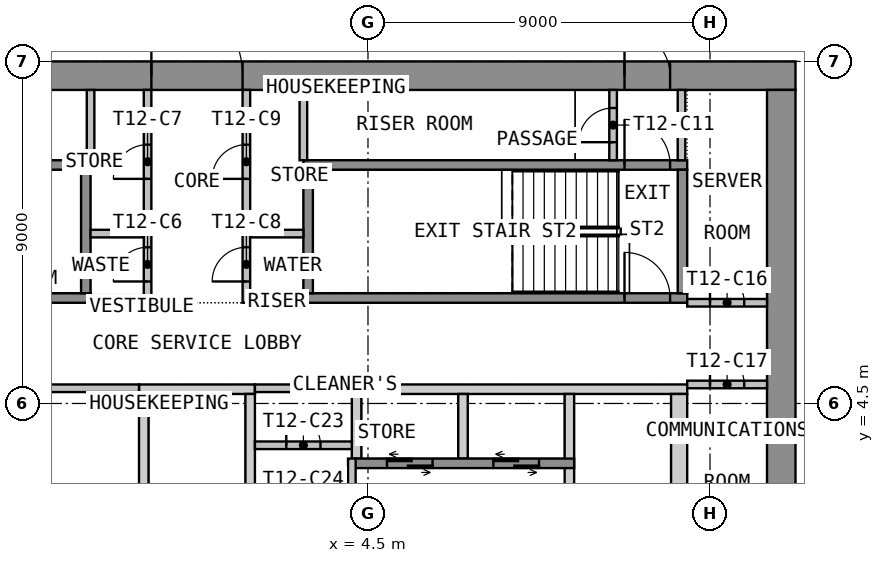
"""IFC4 building model, lengths in metres.
Left out: names, types, materials, properties, quantities, classifications, styles, units other than length and angle.
Written with IfcOpenShell. Run it as: python <this file> out.ifc"""

import sys

from ifc_helpers import new_model, si_unit, direction, frame, frame_2d, origin, place, context, subcontext, project, spatial, polyline, rectangle, outline, extrude, element, fill, save


model = new_model("IFC4")
c1 = context("Model", 3, precision=1e-05, world=origin(), true_north=direction((0.0, 1.0)))
c2 = subcontext(c1, "Body", "Model", "MODEL_VIEW")
j1 = project(units=[si_unit("LENGTHUNIT", "METRE"), si_unit("PLANEANGLEUNIT", "RADIAN")], contexts=[c1])
p1 = place(None, origin())
s1 = spatial("IfcSite", under=j1, at=p1, CompositionType="ELEMENT")
p2 = place(p1, origin())
s2 = spatial("IfcBuilding", under=s1, at=p2, CompositionType="ELEMENT")
p3 = place(p2, frame((0.0, 0.0, 167.7)))
s3 = spatial("IfcBuildingStorey", under=s2, at=p3, CompositionType="ELEMENT", Elevation=167.7)
p4 = place(p3, frame((-15.75, 13.125, 0.0), z_axis=(0.0, 0.0, 1.0), x_axis=(1.0, 0.0, 0.0)))
e1 = element("IfcWall", 1, at=p4, inside=s3, PredefinedType="SHEAR", context=c2, shape_type="SweptSolid", body=[
    extrude(rectangle(XDim=31.5, YDim=0.75, at=frame_2d((15.75, 0.0))), origin(), (0.0, 0.0, 1.0), 3.575),
])
p5 = place(p4, frame((14.55, 0.0, 0.0)))
e2 = element("IfcOpeningElement", 2, at=p5, cuts=e1, PredefinedType="OPENING", context=c2, shape_type="SweptSolid", body=[
    extrude(rectangle(XDim=2.4, YDim=2.1, at=frame_2d((1.2, 1.05))), frame((0.0, 0.385, 0.0), z_axis=(0.0, -1.0, 0.0), x_axis=(1.0, 0.0, 0.0)), (0.0, 0.0, 1.0), 0.77),
])
p6 = place(p4, frame((3.3, 0.0, 0.0)))
e3 = element("IfcOpeningElement", 3, at=p6, cuts=e1, PredefinedType="OPENING", context=c2, shape_type="SweptSolid", body=[
    extrude(rectangle(XDim=1.2, YDim=2.1, at=frame_2d((0.6, 1.05))), frame((0.0, 0.385, 0.0), z_axis=(0.0, -1.0, 0.0), x_axis=(1.0, 0.0, 0.0)), (0.0, 0.0, 1.0), 0.77),
])
p7 = place(p4, frame((27.0, 0.0, 0.0)))
e4 = element("IfcOpeningElement", 4, at=p7, cuts=e1, PredefinedType="OPENING", context=c2, shape_type="SweptSolid", body=[
    extrude(rectangle(XDim=1.2, YDim=2.1, at=frame_2d((0.6, 1.05))), frame((0.0, 0.385, 0.0), z_axis=(0.0, -1.0, 0.0), x_axis=(1.0, 0.0, 0.0)), (0.0, 0.0, 1.0), 0.77),
])
p8 = place(p3, frame((15.375, -12.75, 0.0), z_axis=(0.0, 0.0, 1.0), x_axis=(0.0, 1.0, 0.0)))
e5 = element("IfcWall", 5, at=p8, inside=s3, PredefinedType="SHEAR", context=c2, shape_type="SweptSolid", body=[
    extrude(rectangle(XDim=25.5, YDim=0.75, at=frame_2d((12.75, 0.0))), origin(), (0.0, 0.0, 1.0), 3.575),
])
p9 = place(p8, frame((11.55, 0.0, 0.0)))
e6 = element("IfcOpeningElement", 6, at=p9, cuts=e5, PredefinedType="OPENING", context=c2, shape_type="SweptSolid", body=[
    extrude(rectangle(XDim=2.4, YDim=2.1, at=frame_2d((1.2, 1.05))), frame((0.0, 0.385, 0.0), z_axis=(0.0, -1.0, 0.0), x_axis=(1.0, 0.0, 0.0)), (0.0, 0.0, 1.0), 0.77),
])
p10 = place(p3, origin())
e7 = element("IfcWall", 7, at=p10, inside=s3, PredefinedType="SHEAR", context=c2, shape_type="SweptSolid", body=[
    extrude(outline(polyline([(-1.525, 4.75), (1.525, 4.75), (1.525, 5.0), (-1.525, 5.0), (-1.525, 4.75)])), origin(), (0.0, 0.0, 1.0), 3.575),
])
p11 = place(p3, origin())
e8 = element("IfcWall", 8, at=p11, inside=s3, PredefinedType="SHEAR", context=c2, shape_type="SweptSolid", body=[
    extrude(outline(polyline([(4.075, 4.75), (12.9, 4.75), (12.9, 5.0), (4.075, 5.0), (4.075, 4.75)])), origin(), (0.0, 0.0, 1.0), 3.575),
])
p12 = place(p3, origin())
e9 = element("IfcWall", 9, at=p12, inside=s3, PredefinedType="SHEAR", context=c2, shape_type="SweptSolid", body=[
    extrude(outline(polyline([(-1.525, 2.05), (-1.275, 2.05), (-1.275, 4.75), (-1.525, 4.75), (-1.525, 2.05)])), origin(), (0.0, 0.0, 1.0), 3.575),
])
p13 = place(p3, origin())
e10 = element("IfcWall", 10, at=p13, inside=s3, PredefinedType="SHEAR", context=c2, shape_type="SweptSolid", body=[
    extrude(outline(polyline([(1.275, 2.05), (1.525, 2.05), (1.525, 4.75), (1.275, 4.75), (1.275, 2.05)])), origin(), (0.0, 0.0, 1.0), 3.575),
])
p14 = place(p3, origin())
e11 = element("IfcWall", 11, at=p14, inside=s3, PredefinedType="SHEAR", context=c2, shape_type="SweptSolid", body=[
    extrude(outline(polyline([(9.675, 2.05), (9.925, 2.05), (9.925, 4.75), (9.675, 4.75), (9.675, 2.05)])), origin(), (0.0, 0.0, 1.0), 3.575),
])
p15 = place(p3, origin())
e12 = element("IfcWall", 12, at=p15, inside=s3, PredefinedType="SHEAR", context=c2, shape_type="SweptSolid", body=[
    extrude(outline(polyline([(12.475, 2.05), (12.9, 2.05), (12.9, 4.75), (12.475, 4.75), (12.475, 2.05)])), origin(), (0.0, 0.0, 1.0), 3.575),
])
p16 = place(p3, origin())
e13 = element("IfcWall", 13, at=p16, inside=s3, PredefinedType="SHEAR", context=c2, shape_type="SweptSolid", body=[
    extrude(outline(polyline([(4.075, 3.05), (4.325, 3.05), (4.325, 4.75), (4.075, 4.75), (4.075, 3.05)])), origin(), (0.0, 0.0, 1.0), 3.575),
])
p17 = place(p3, origin())
e14 = element("IfcWall", 14, at=p17, inside=s3, PredefinedType="SHEAR", context=c2, shape_type="SweptSolid", body=[
    extrude(outline(polyline([(6.875, 3.05), (7.125, 3.05), (7.125, 4.75), (6.875, 4.75), (6.875, 3.05)])), origin(), (0.0, 0.0, 1.0), 3.575),
])
p18 = place(p3, frame((4.075, 2.925, 0.0), z_axis=(0.0, 0.0, 1.0), x_axis=(1.0, 0.0, 0.0)))
e15 = element("IfcWall", 15, at=p18, inside=s3, PredefinedType="SHEAR", context=c2, shape_type="SweptSolid", body=[
    extrude(rectangle(XDim=5.85, YDim=0.25, at=frame_2d((2.925, 0.0))), origin(), (0.0, 0.0, 1.0), 3.575),
])
p19 = place(p18, frame((0.925, 0.0, 0.0)))
e16 = element("IfcOpeningElement", 16, at=p19, cuts=e15, PredefinedType="OPENING", context=c2, shape_type="SweptSolid", body=[
    extrude(rectangle(XDim=1.2, YDim=2.1, at=frame_2d((0.6, 1.05))), frame((0.0, 0.135, 0.0), z_axis=(0.0, -1.0, 0.0), x_axis=(1.0, 0.0, 0.0)), (0.0, 0.0, 1.0), 0.27),
])
p20 = place(p18, frame((3.725, 0.0, 0.0)))
e17 = element("IfcOpeningElement", 17, at=p20, cuts=e15, PredefinedType="OPENING", context=c2, shape_type="SweptSolid", body=[
    extrude(rectangle(XDim=1.2, YDim=2.1, at=frame_2d((0.6, 1.05))), frame((0.0, 0.135, 0.0), z_axis=(0.0, -1.0, 0.0), x_axis=(1.0, 0.0, 0.0)), (0.0, 0.0, 1.0), 0.27),
])
p21 = place(p3, frame((-12.9, 7.275, 0.0), z_axis=(0.0, 0.0, 1.0), x_axis=(1.0, 0.0, 0.0)))
e18 = element("IfcWall", 18, at=p21, inside=s3, PredefinedType="SHEAR", context=c2, shape_type="SweptSolid", body=[
    extrude(rectangle(XDim=10.1, YDim=0.25, at=frame_2d((5.05, 0.0))), origin(), (0.0, 0.0, 1.0), 3.575),
])
p22 = place(p21, frame((0.45, 0.0, 0.0)))
e19 = element("IfcOpeningElement", 19, at=p22, cuts=e18, PredefinedType="OPENING", context=c2, shape_type="SweptSolid", body=[
    extrude(rectangle(XDim=1.2, YDim=2.1, at=frame_2d((0.6, 1.05))), frame((0.0, 0.135, 0.0), z_axis=(0.0, -1.0, 0.0), x_axis=(1.0, 0.0, 0.0)), (0.0, 0.0, 1.0), 0.27),
])
p23 = place(p3, frame((-12.9, 10.775, 0.0), z_axis=(0.0, 0.0, 1.0), x_axis=(1.0, 0.0, 0.0)))
e20 = element("IfcWall", 20, at=p23, inside=s3, PredefinedType="SHEAR", context=c2, shape_type="SweptSolid", body=[
    extrude(rectangle(XDim=10.1, YDim=0.25, at=frame_2d((5.05, 0.0))), origin(), (0.0, 0.0, 1.0), 3.575),
])
p24 = place(p23, frame((0.45, 0.0, 0.0)))
e21 = element("IfcOpeningElement", 21, at=p24, cuts=e20, PredefinedType="OPENING", context=c2, shape_type="SweptSolid", body=[
    extrude(rectangle(XDim=1.2, YDim=2.1, at=frame_2d((0.6, 1.05))), frame((0.0, 0.135, 0.0), z_axis=(0.0, -1.0, 0.0), x_axis=(1.0, 0.0, 0.0)), (0.0, 0.0, 1.0), 0.27),
])
p25 = place(p3, frame((-2.925, 7.4, 0.0), z_axis=(0.0, 0.0, 1.0), x_axis=(0.0, 1.0, 0.0)))
e22 = element("IfcWall", 22, at=p25, inside=s3, PredefinedType="SHEAR", context=c2, shape_type="SweptSolid", body=[
    extrude(rectangle(XDim=3.25, YDim=0.25, at=frame_2d((1.625, 0.0))), origin(), (0.0, 0.0, 1.0), 3.575),
])
p26 = place(p3, frame((2.8, 7.275, 0.0), z_axis=(0.0, 0.0, 1.0), x_axis=(1.0, 0.0, 0.0)))
e23 = element("IfcWall", 23, at=p26, inside=s3, PredefinedType="SHEAR", context=c2, shape_type="SweptSolid", body=[
    extrude(rectangle(XDim=10.1, YDim=0.25, at=frame_2d((5.05, 0.0))), origin(), (0.0, 0.0, 1.0), 3.575),
])
p27 = place(p26, frame((8.45, 0.0, 0.0)))
e24 = element("IfcOpeningElement", 24, at=p27, cuts=e23, PredefinedType="OPENING", context=c2, shape_type="SweptSolid", body=[
    extrude(rectangle(XDim=1.2, YDim=2.1, at=frame_2d((0.6, 1.05))), frame((0.0, 0.135, 0.0), z_axis=(0.0, -1.0, 0.0), x_axis=(1.0, 0.0, 0.0)), (0.0, 0.0, 1.0), 0.27),
])
p28 = place(p3, frame((2.8, 10.775, 0.0), z_axis=(0.0, 0.0, 1.0), x_axis=(1.0, 0.0, 0.0)))
e25 = element("IfcWall", 25, at=p28, inside=s3, PredefinedType="SHEAR", context=c2, shape_type="SweptSolid", body=[
    extrude(rectangle(XDim=10.1, YDim=0.25, at=frame_2d((5.05, 0.0))), origin(), (0.0, 0.0, 1.0), 3.575),
])
p29 = place(p28, frame((8.45, 0.0, 0.0)))
e26 = element("IfcOpeningElement", 26, at=p29, cuts=e25, PredefinedType="OPENING", context=c2, shape_type="SweptSolid", body=[
    extrude(rectangle(XDim=1.2, YDim=2.1, at=frame_2d((0.6, 1.05))), frame((0.0, 0.135, 0.0), z_axis=(0.0, -1.0, 0.0), x_axis=(1.0, 0.0, 0.0)), (0.0, 0.0, 1.0), 0.27),
])
for number, where, z_axis, x_axis in (
    (27, (2.925, 7.4, 0.0), (0.0, 0.0, 1.0), (0.0, 1.0, 0.0)),
    (28, (12.775, 7.4, 0.0), (0.0, 0.0, 1.0), (0.0, 1.0, 0.0)),
):
    element("IfcWall", number, at=place(p3, frame(where, z_axis=z_axis, x_axis=x_axis)), inside=s3, PredefinedType="SHEAR", context=c2, shape_type="SweptSolid", body=[
        extrude(rectangle(XDim=3.25, YDim=0.25, at=frame_2d((1.625, 0.0))), origin(), (0.0, 0.0, 1.0), 3.575),
    ])
for number, where, z_axis, x_axis in (
    (29, (-2.8, 7.25, 0.0), (0.0, 0.0, 1.0), (1.0, 0.0, 0.0)),
    (30, (-2.8, 8.97, 0.0), (0.0, 0.0, 1.0), (1.0, 0.0, 0.0)),
    (31, (1.4, 7.25, 0.0), (0.0, 0.0, 1.0), (1.0, 0.0, 0.0)),
    (32, (1.4, 8.97, 0.0), (0.0, 0.0, 1.0), (1.0, 0.0, 0.0)),
):
    element("IfcWall", number, at=place(p3, frame(where, z_axis=z_axis, x_axis=x_axis)), inside=s3, PredefinedType="PARTITIONING", context=c2, shape_type="SweptSolid", body=[
        extrude(rectangle(XDim=1.4, YDim=0.2, at=frame_2d((0.7, 0.0))), origin(), (0.0, 0.0, 1.0), 3.575),
    ])
p30 = place(p3, frame((-1.3, 7.15, 0.0), z_axis=(0.0, 0.0, 1.0), x_axis=(0.0, 1.0, 0.0)))
e33 = element("IfcWall", 33, at=p30, inside=s3, PredefinedType="PARTITIONING", context=c2, shape_type="SweptSolid", body=[
    extrude(rectangle(XDim=5.6, YDim=0.2, at=frame_2d((2.8, 0.0))), origin(), (0.0, 0.0, 1.0), 3.575),
])
p31 = place(p30, frame((0.56, 0.0, 0.0)))
e34 = element("IfcOpeningElement", 34, at=p31, cuts=e33, PredefinedType="OPENING", context=c2, shape_type="SweptSolid", body=[
    extrude(rectangle(XDim=0.9, YDim=2.1, at=frame_2d((0.45, 1.05))), frame((0.0, 0.11, 0.0), z_axis=(0.0, -1.0, 0.0), x_axis=(1.0, 0.0, 0.0)), (0.0, 0.0, 1.0), 0.22),
])
p32 = place(p30, frame((3.26, 0.0, 0.0)))
e35 = element("IfcOpeningElement", 35, at=p32, cuts=e33, PredefinedType="OPENING", context=c2, shape_type="SweptSolid", body=[
    extrude(rectangle(XDim=0.9, YDim=2.1, at=frame_2d((0.45, 1.05))), frame((0.0, 0.11, 0.0), z_axis=(0.0, -1.0, 0.0), x_axis=(1.0, 0.0, 0.0)), (0.0, 0.0, 1.0), 0.22),
])
p33 = place(p3, frame((1.3, 7.15, 0.0), z_axis=(0.0, 0.0, 1.0), x_axis=(0.0, 1.0, 0.0)))
e36 = element("IfcWall", 36, at=p33, inside=s3, PredefinedType="PARTITIONING", context=c2, shape_type="SweptSolid", body=[
    extrude(rectangle(XDim=5.6, YDim=0.2, at=frame_2d((2.8, 0.0))), origin(), (0.0, 0.0, 1.0), 3.575),
])
p34 = place(p33, frame((0.56, 0.0, 0.0)))
e37 = element("IfcOpeningElement", 37, at=p34, cuts=e36, PredefinedType="OPENING", context=c2, shape_type="SweptSolid", body=[
    extrude(rectangle(XDim=0.9, YDim=2.1, at=frame_2d((0.45, 1.05))), frame((0.0, 0.11, 0.0), z_axis=(0.0, -1.0, 0.0), x_axis=(1.0, 0.0, 0.0)), (0.0, 0.0, 1.0), 0.22),
])
p35 = place(p33, frame((3.26, 0.0, 0.0)))
e38 = element("IfcOpeningElement", 38, at=p35, cuts=e36, PredefinedType="OPENING", context=c2, shape_type="SweptSolid", body=[
    extrude(rectangle(XDim=0.9, YDim=2.1, at=frame_2d((0.45, 1.05))), frame((0.0, 0.11, 0.0), z_axis=(0.0, -1.0, 0.0), x_axis=(1.0, 0.0, 0.0)), (0.0, 0.0, 1.0), 0.22),
])
p36 = place(p3, frame((12.75, 10.9, 0.0), z_axis=(0.0, 0.0, 1.0), x_axis=(0.0, 1.0, 0.0)))
e39 = element("IfcWall", 39, at=p36, inside=s3, PredefinedType="PARTITIONING", context=c2, shape_type="SweptSolid", body=[
    extrude(rectangle(XDim=1.85, YDim=0.2, at=frame_2d((0.925, 0.0))), origin(), (0.0, 0.0, 1.0), 3.575),
])
p37 = place(p3, frame((10.95, 10.9, 0.0), z_axis=(0.0, 0.0, 1.0), x_axis=(0.0, 1.0, 0.0)))
e40 = element("IfcWall", 40, at=p37, inside=s3, PredefinedType="PARTITIONING", context=c2, shape_type="SweptSolid", body=[
    extrude(rectangle(XDim=1.85, YDim=0.2, at=frame_2d((0.925, 0.0))), origin(), (0.0, 0.0, 1.0), 3.575),
])
p38 = place(p37, frame((0.475, 0.0, 0.0)))
e41 = element("IfcOpeningElement", 41, at=p38, cuts=e40, PredefinedType="OPENING", context=c2, shape_type="SweptSolid", body=[
    extrude(rectangle(XDim=0.9, YDim=2.1, at=frame_2d((0.45, 1.05))), frame((0.0, 0.11, 0.0), z_axis=(0.0, -1.0, 0.0), x_axis=(1.0, 0.0, 0.0)), (0.0, 0.0, 1.0), 0.22),
])
p39 = place(p3, frame((12.9, 7.15, 0.0), z_axis=(0.0, 0.0, 1.0), x_axis=(1.0, 0.0, 0.0)))
e42 = element("IfcWall", 42, at=p39, inside=s3, PredefinedType="PARTITIONING", context=c2, shape_type="SweptSolid", body=[
    extrude(rectangle(XDim=2.1, YDim=0.2, at=frame_2d((1.05, 0.0))), origin(), (0.0, 0.0, 1.0), 3.575),
])
p40 = place(p39, frame((0.6, 0.0, 0.0)))
e43 = element("IfcOpeningElement", 43, at=p40, cuts=e42, PredefinedType="OPENING", context=c2, shape_type="SweptSolid", body=[
    extrude(rectangle(XDim=0.9, YDim=2.1, at=frame_2d((0.45, 1.05))), frame((0.0, 0.11, 0.0), z_axis=(0.0, -1.0, 0.0), x_axis=(1.0, 0.0, 0.0)), (0.0, 0.0, 1.0), 0.22),
])
p41 = place(p3, frame((12.9, 5.0, 0.0), z_axis=(0.0, 0.0, 1.0), x_axis=(1.0, 0.0, 0.0)))
e44 = element("IfcWall", 44, at=p41, inside=s3, PredefinedType="PARTITIONING", context=c2, shape_type="SweptSolid", body=[
    extrude(rectangle(XDim=2.1, YDim=0.2, at=frame_2d((1.05, 0.0))), origin(), (0.0, 0.0, 1.0), 3.575),
])
p42 = place(p41, frame((0.6, 0.0, 0.0)))
e45 = element("IfcOpeningElement", 45, at=p42, cuts=e44, PredefinedType="OPENING", context=c2, shape_type="SweptSolid", body=[
    extrude(rectangle(XDim=0.9, YDim=2.1, at=frame_2d((0.45, 1.05))), frame((0.0, 0.11, 0.0), z_axis=(0.0, -1.0, 0.0), x_axis=(1.0, 0.0, 0.0)), (0.0, 0.0, 1.0), 0.22),
])
p43 = place(p3, frame((-12.9, 4.9, 0.0), z_axis=(0.0, 0.0, 1.0), x_axis=(1.0, 0.0, 0.0)))
e46 = element("IfcWall", 46, at=p43, inside=s3, PredefinedType="PARTITIONING", context=c2, shape_type="SweptSolid", body=[
    extrude(rectangle(XDim=11.375, YDim=0.2, at=frame_2d((5.688, 0.0))), origin(), (0.0, 0.0, 1.0), 3.575),
])
p44 = place(p3, frame((1.525, 3.4, 0.0), z_axis=(0.0, 0.0, 1.0), x_axis=(1.0, 0.0, 0.0)))
e47 = element("IfcWall", 47, at=p44, inside=s3, PredefinedType="PARTITIONING", context=c2, shape_type="SweptSolid", body=[
    extrude(rectangle(XDim=2.55, YDim=0.2, at=frame_2d((1.275, 0.0))), origin(), (0.0, 0.0, 1.0), 3.575),
])
p45 = place(p44, frame((0.825, 0.0, 0.0)))
e48 = element("IfcOpeningElement", 48, at=p45, cuts=e47, PredefinedType="OPENING", context=c2, shape_type="SweptSolid", body=[
    extrude(rectangle(XDim=0.9, YDim=2.1, at=frame_2d((0.45, 1.05))), frame((0.0, 0.11, 0.0), z_axis=(0.0, -1.0, 0.0), x_axis=(1.0, 0.0, 0.0)), (0.0, 0.0, 1.0), 0.22),
])
p46 = place(p3, frame((1.525, 4.9, 0.0), z_axis=(0.0, 0.0, 1.0), x_axis=(1.0, 0.0, 0.0)))
e49 = element("IfcWall", 49, at=p46, inside=s3, PredefinedType="PARTITIONING", context=c2, shape_type="SweptSolid", body=[
    extrude(rectangle(XDim=2.55, YDim=0.2, at=frame_2d((1.275, 0.0))), origin(), (0.0, 0.0, 1.0), 3.575),
])
p47 = place(p3, frame((4.075, 1.9, 0.0), z_axis=(0.0, 0.0, 1.0), x_axis=(0.0, 1.0, 0.0)))
e50 = element("IfcWall", 50, at=p47, inside=s3, PredefinedType="PARTITIONING", context=c2, shape_type="SweptSolid", body=[
    extrude(rectangle(XDim=1.15, YDim=0.2, at=frame_2d((0.575, 0.0))), origin(), (0.0, 0.0, 1.0), 3.575),
])
for number, where, z_axis, x_axis in (
    (51, (-2.8, 10.901, 0.0), (0.0, 0.0, 1.0), (0.0, 1.0, 0.0)),
    (52, (2.8, 12.749, 0.0), (0.0, 0.0, 1.0), (0.0, -1.0, 0.0)),
):
    element("IfcWall", number, at=place(p3, frame(where, z_axis=z_axis, x_axis=x_axis)), inside=s3, PredefinedType="PARTITIONING", context=c2, shape_type="SweptSolid", body=[
        extrude(rectangle(XDim=1.848, YDim=0.2, at=frame_2d((0.924, 0.0))), origin(), (0.0, 0.0, 1.0), 3.575),
    ])
p48 = place(p5, origin())
e53 = element("IfcDoor", 53, at=p48, inside=s3, OperationType="DOUBLE_DOOR_DOUBLE_SWING", PredefinedType="DOOR", context=c2, shape_type="SweptSolid", body=[
    extrude(rectangle(XDim=2.4, YDim=2.1, at=frame_2d((1.2, 1.05))), frame((0.0, 0.025, 0.0), z_axis=(0.0, -1.0, 0.0), x_axis=(1.0, 0.0, 0.0)), (0.0, 0.0, 1.0), 0.05),
])
fill(e2, e53)
p49 = place(p7, origin())
e54 = element("IfcDoor", 54, at=p49, inside=s3, OperationType="SINGLE_SWING_RIGHT", PredefinedType="DOOR", context=c2, shape_type="SweptSolid", body=[
    extrude(rectangle(XDim=1.2, YDim=2.1, at=frame_2d((0.6, 1.05))), frame((0.0, 0.025, 0.0), z_axis=(0.0, -1.0, 0.0), x_axis=(1.0, 0.0, 0.0)), (0.0, 0.0, 1.0), 0.05),
])
fill(e4, e54)
p50 = place(p19, origin())
e55 = element("IfcDoor", 55, at=p50, inside=s3, OperationType="DOUBLE_DOOR_SLIDING", PredefinedType="DOOR", context=c2, shape_type="SweptSolid", body=[
    extrude(rectangle(XDim=1.2, YDim=2.1, at=frame_2d((0.6, 1.05))), frame((0.0, 0.025, 0.0), z_axis=(0.0, -1.0, 0.0), x_axis=(1.0, 0.0, 0.0)), (0.0, 0.0, 1.0), 0.05),
])
fill(e16, e55)
p51 = place(p20, origin())
e56 = element("IfcDoor", 56, at=p51, inside=s3, OperationType="DOUBLE_DOOR_SLIDING", PredefinedType="DOOR", context=c2, shape_type="SweptSolid", body=[
    extrude(rectangle(XDim=1.2, YDim=2.1, at=frame_2d((0.6, 1.05))), frame((0.0, 0.025, 0.0), z_axis=(0.0, -1.0, 0.0), x_axis=(1.0, 0.0, 0.0)), (0.0, 0.0, 1.0), 0.05),
])
fill(e17, e56)
p52 = place(p27, origin())
e57 = element("IfcDoor", 57, at=p52, inside=s3, OperationType="SINGLE_SWING_LEFT", PredefinedType="DOOR", context=c2, shape_type="SweptSolid", body=[
    extrude(rectangle(XDim=1.2, YDim=2.1, at=frame_2d((0.6, 1.05))), frame((0.0, 0.025, 0.0), z_axis=(0.0, -1.0, 0.0), x_axis=(1.0, 0.0, 0.0)), (0.0, 0.0, 1.0), 0.05),
])
fill(e24, e57)
p53 = place(p31, origin())
e58 = element("IfcDoor", 58, at=p53, inside=s3, OperationType="SINGLE_SWING_LEFT", PredefinedType="DOOR", context=c2, shape_type="SweptSolid", body=[
    extrude(rectangle(XDim=0.9, YDim=2.1, at=frame_2d((0.45, 1.05))), frame((0.0, 0.025, 0.0), z_axis=(0.0, -1.0, 0.0), x_axis=(1.0, 0.0, 0.0)), (0.0, 0.0, 1.0), 0.05),
])
fill(e34, e58)
p54 = place(p32, origin())
e59 = element("IfcDoor", 59, at=p54, inside=s3, OperationType="SINGLE_SWING_LEFT", PredefinedType="DOOR", context=c2, shape_type="SweptSolid", body=[
    extrude(rectangle(XDim=0.9, YDim=2.1, at=frame_2d((0.45, 1.05))), frame((0.0, 0.025, 0.0), z_axis=(0.0, -1.0, 0.0), x_axis=(1.0, 0.0, 0.0)), (0.0, 0.0, 1.0), 0.05),
])
fill(e35, e59)
p55 = place(p34, origin())
e60 = element("IfcDoor", 60, at=p55, inside=s3, OperationType="SINGLE_SWING_LEFT", PredefinedType="DOOR", context=c2, shape_type="SweptSolid", body=[
    extrude(rectangle(XDim=0.9, YDim=2.1, at=frame_2d((0.45, 1.05))), frame((0.0, 0.025, 0.0), z_axis=(0.0, -1.0, 0.0), x_axis=(1.0, 0.0, 0.0)), (0.0, 0.0, 1.0), 0.05),
])
fill(e37, e60)
p56 = place(p35, origin())
e61 = element("IfcDoor", 61, at=p56, inside=s3, OperationType="SINGLE_SWING_LEFT", PredefinedType="DOOR", context=c2, shape_type="SweptSolid", body=[
    extrude(rectangle(XDim=0.9, YDim=2.1, at=frame_2d((0.45, 1.05))), frame((0.0, 0.025, 0.0), z_axis=(0.0, -1.0, 0.0), x_axis=(1.0, 0.0, 0.0)), (0.0, 0.0, 1.0), 0.05),
])
fill(e38, e61)
p57 = place(p29, origin())
e62 = element("IfcDoor", 62, at=p57, inside=s3, OperationType="SINGLE_SWING_RIGHT", PredefinedType="DOOR", context=c2, shape_type="SweptSolid", body=[
    extrude(rectangle(XDim=1.2, YDim=2.1, at=frame_2d((0.6, 1.05))), frame((0.0, 0.025, 0.0), z_axis=(0.0, -1.0, 0.0), x_axis=(1.0, 0.0, 0.0)), (0.0, 0.0, 1.0), 0.05),
])
fill(e26, e62)
p58 = place(p38, origin())
e63 = element("IfcDoor", 63, at=p58, inside=s3, OperationType="SINGLE_SWING_LEFT", PredefinedType="DOOR", context=c2, shape_type="SweptSolid", body=[
    extrude(rectangle(XDim=0.9, YDim=2.1, at=frame_2d((0.45, 1.05))), frame((0.0, 0.025, 0.0), z_axis=(0.0, -1.0, 0.0), x_axis=(1.0, 0.0, 0.0)), (0.0, 0.0, 1.0), 0.05),
])
fill(e41, e63)
p59 = place(p40, origin())
e64 = element("IfcDoor", 64, at=p59, inside=s3, OperationType="SINGLE_SWING_LEFT", PredefinedType="DOOR", context=c2, shape_type="SweptSolid", body=[
    extrude(rectangle(XDim=0.9, YDim=2.1, at=frame_2d((0.45, 1.05))), frame((0.0, 0.025, 0.0), z_axis=(0.0, -1.0, 0.0), x_axis=(1.0, 0.0, 0.0)), (0.0, 0.0, 1.0), 0.05),
])
fill(e43, e64)
p60 = place(p42, origin())
e65 = element("IfcDoor", 65, at=p60, inside=s3, OperationType="SINGLE_SWING_LEFT", PredefinedType="DOOR", context=c2, shape_type="SweptSolid", body=[
    extrude(rectangle(XDim=0.9, YDim=2.1, at=frame_2d((0.45, 1.05))), frame((0.0, 0.025, 0.0), z_axis=(0.0, -1.0, 0.0), x_axis=(1.0, 0.0, 0.0)), (0.0, 0.0, 1.0), 0.05),
])
fill(e45, e65)
p61 = place(p45, origin())
e66 = element("IfcDoor", 66, at=p61, inside=s3, OperationType="SINGLE_SWING_LEFT", PredefinedType="DOOR", context=c2, shape_type="SweptSolid", body=[
    extrude(rectangle(XDim=0.9, YDim=2.1, at=frame_2d((0.45, 1.05))), frame((0.0, 0.025, 0.0), z_axis=(0.0, -1.0, 0.0), x_axis=(1.0, 0.0, 0.0)), (0.0, 0.0, 1.0), 0.05),
])
fill(e48, e66)
save(model, sys.argv[1])
